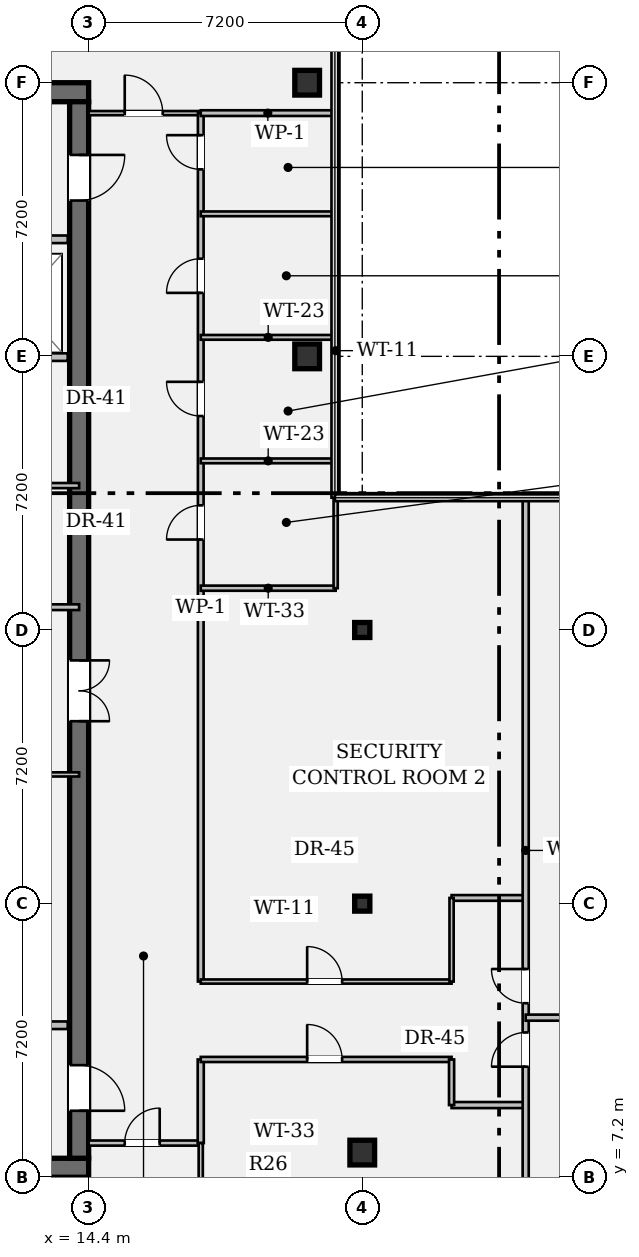
"""IFC4 building model, lengths in metres.
Left out: names, types, materials, properties, quantities, classifications, styles, units other than length and angle.
Written with IfcOpenShell. Run it as: python <this file> out.ifc"""

import sys

from ifc_helpers import new_model, si_unit, direction, frame, frame_2d, origin, origin_2d, place, context, subcontext, project, spatial, rectangle, hollow_rectangle, i_section, extrude, element, fill, save


model = new_model("IFC4")
c1 = context("Model", 3, precision=1e-05, world=origin(), true_north=direction((0.0, 1.0)))
c2 = subcontext(c1, "Body", "Model", "MODEL_VIEW")
j1 = project(units=[si_unit("LENGTHUNIT", "METRE"), si_unit("PLANEANGLEUNIT", "RADIAN")], contexts=[c1])
p1 = place(None, origin())
s1 = spatial("IfcSite", under=j1, at=p1, CompositionType="ELEMENT")
p2 = place(p1, origin())
s2 = spatial("IfcBuilding", under=s1, at=p2, CompositionType="ELEMENT")
p3 = place(p2, frame((0.0, 0.0, 244.65)))
s3 = spatial("IfcBuildingStorey", under=s2, at=p3, CompositionType="ELEMENT", Elevation=244.65)
for number, where, z_axis, x_axis in (
    (1, (0.5, 7.45, 0.0), (0.0, 0.0, 1.0), (1.0, 0.0, 0.0)),
    (2, (0.5, 35.75, 0.0), (0.0, 0.0, 1.0), (1.0, 0.0, 0.0)),
):
    element("IfcWall", number, at=place(p3, frame(where, z_axis=z_axis, x_axis=x_axis)), inside=s3, PredefinedType="SHEAR", context=c2, shape_type="SweptSolid", body=[
        extrude(rectangle(XDim=13.9, YDim=0.5, at=frame_2d((6.95, 0.0))), origin(), (0.0, 0.0, 1.0), 3.24),
    ])
p4 = place(p3, frame((14.15, 35.5, 0.0), z_axis=(0.0, 0.0, 1.0), x_axis=(0.0, -1.0, 0.0)))
e3 = element("IfcWall", 3, at=p4, inside=s3, PredefinedType="SHEAR", context=c2, shape_type="SweptSolid", body=[
    extrude(rectangle(XDim=27.8, YDim=0.5, at=frame_2d((13.9, 0.0))), origin(), (0.0, 0.0, 1.0), 3.24),
])
p5 = place(p4, frame((1.4, 0.0, 0.0)))
e4 = element("IfcOpeningElement", 4, at=p5, cuts=e3, PredefinedType="OPENING", context=c2, shape_type="SweptSolid", body=[
    extrude(rectangle(XDim=1.2, YDim=2.15, at=frame_2d((0.6, 1.075))), frame((0.0, 0.262, 0.0), z_axis=(0.0, -1.0, 0.0), x_axis=(1.0, 0.0, 0.0)), (0.0, 0.0, 1.0), 0.524),
])
p6 = place(p4, frame((25.35, 0.0, 0.0)))
e5 = element("IfcOpeningElement", 5, at=p6, cuts=e3, PredefinedType="OPENING", context=c2, shape_type="SweptSolid", body=[
    extrude(rectangle(XDim=1.2, YDim=2.15, at=frame_2d((0.6, 1.075))), frame((0.0, 0.262, 0.0), z_axis=(0.0, -1.0, 0.0), x_axis=(1.0, 0.0, 0.0)), (0.0, 0.0, 1.0), 0.524),
])
p7 = place(p4, frame((14.7, 0.0, 0.0)))
e6 = element("IfcOpeningElement", 6, at=p7, cuts=e3, PredefinedType="OPENING", context=c2, shape_type="SweptSolid", body=[
    extrude(rectangle(XDim=1.6, YDim=2.2, at=frame_2d((0.8, 1.1))), frame((0.0, 0.262, 0.0), z_axis=(0.0, -1.0, 0.0), x_axis=(1.0, 0.0, 0.0)), (0.0, 0.0, 1.0), 0.524),
])
for number, where, z_axis, x_axis in (
    (7, (20.15, 28.8, 0.0), (0.0, 0.0, 1.0), (1.0, 0.0, 0.0)),
    (8, (20.15, 36.0, 0.0), (0.0, 0.0, 1.0), (1.0, 0.0, 0.0)),
    (9, (21.6, 7.85, 0.0), (0.0, 0.0, 1.0), (1.0, 0.0, 0.0)),
):
    element("IfcColumn", number, at=place(p3, frame(where, z_axis=z_axis, x_axis=x_axis)), inside=s3, PredefinedType="COLUMN", context=c2, shape_type="SweptSolid", body=[
        extrude(hollow_rectangle(XDim=0.65, YDim=0.65, WallThickness=0.04, at=origin_2d()), origin(), (0.0, 0.0, 1.0), 3.24),
    ])
for number, where, z_axis, x_axis in (
    (10, (21.6, 14.4, 0.0), (0.0, 0.0, 1.0), (1.0, 0.0, 0.0)),
    (11, (21.6, 21.6, 0.0), (0.0, 0.0, 1.0), (1.0, 0.0, 0.0)),
):
    element("IfcColumn", number, at=place(p3, frame(where, z_axis=z_axis, x_axis=x_axis)), inside=s3, PredefinedType="COLUMN", context=c2, shape_type="SweptSolid", body=[
        extrude(i_section(OverallWidth=0.399, OverallDepth=0.394, WebThickness=0.023, FlangeThickness=0.037, FilletRadius=0.018, at=origin_2d()), origin(), (0.0, 0.0, 1.0), 3.24),
    ])
p8 = place(p3, frame((8.7, 31.88, 0.0), z_axis=(0.0, 0.0, 1.0), x_axis=(1.0, 0.0, 0.0)))
e12 = element("IfcWall", 12, at=p8, inside=s3, PredefinedType="PARTITIONING", context=c2, shape_type="SweptSolid", body=[
    extrude(rectangle(XDim=5.15, YDim=0.2, at=frame_2d((2.575, 0.0))), origin(), (0.0, 0.0, 1.0), 3.24),
])
p9 = place(p8, frame((0.75, 0.0, 0.0)))
e13 = element("IfcOpeningElement", 13, at=p9, cuts=e12, PredefinedType="OPENING", context=c2, shape_type="SweptSolid", body=[
    extrude(rectangle(XDim=1.2, YDim=2.2, at=frame_2d((0.6, 1.1))), frame((0.0, 0.112, 0.0), z_axis=(0.0, -1.0, 0.0), x_axis=(1.0, 0.0, 0.0)), (0.0, 0.0, 1.0), 0.224),
])
p10 = place(p8, frame((3.25, 0.0, 0.0)))
e14 = element("IfcOpeningElement", 14, at=p10, cuts=e12, PredefinedType="OPENING", context=c2, shape_type="SweptSolid", body=[
    extrude(rectangle(XDim=1.2, YDim=2.2, at=frame_2d((0.6, 1.1))), frame((0.0, 0.112, 0.0), z_axis=(0.0, -1.0, 0.0), x_axis=(1.0, 0.0, 0.0)), (0.0, 0.0, 1.0), 0.224),
])
for number, where, z_axis, x_axis in (
    (15, (8.7, 11.2, 0.0), (0.0, 0.0, 1.0), (1.0, 0.0, 0.0)),
    (16, (8.7, 28.78, 0.0), (0.0, 0.0, 1.0), (1.0, 0.0, 0.0)),
):
    element("IfcWall", number, at=place(p3, frame(where, z_axis=z_axis, x_axis=x_axis)), inside=s3, PredefinedType="PARTITIONING", context=c2, shape_type="SweptSolid", body=[
        extrude(rectangle(XDim=5.15, YDim=0.2, at=frame_2d((2.575, 0.0))), origin(), (0.0, 0.0, 1.0), 3.24),
    ])
p11 = place(p3, frame((7.1, 22.2, 0.0), z_axis=(0.0, 0.0, 1.0), x_axis=(1.0, 0.0, 0.0)))
e17 = element("IfcWall", 17, at=p11, inside=s3, PredefinedType="PARTITIONING", context=c2, shape_type="SweptSolid", body=[
    extrude(rectangle(XDim=7.05, YDim=0.15, at=frame_2d((3.525, 0.0))), origin(), (0.0, 0.0, 1.0), 3.24),
])
p12 = place(p3, frame((7.1, 25.4, 0.0), z_axis=(0.0, 0.0, 1.0), x_axis=(1.0, 0.0, 0.0)))
e18 = element("IfcWall", 18, at=p12, inside=s3, PredefinedType="PARTITIONING", context=c2, shape_type="SweptSolid", body=[
    extrude(rectangle(XDim=7.05, YDim=0.135, at=frame_2d((3.525, 0.0))), origin(), (0.0, 0.0, 1.0), 3.24),
])
p13 = place(p3, frame((5.15, 17.8, 0.0), z_axis=(0.0, 0.0, 1.0), x_axis=(1.0, 0.0, 0.0)))
e19 = element("IfcWall", 19, at=p13, inside=s3, PredefinedType="PARTITIONING", context=c2, shape_type="SweptSolid", body=[
    extrude(rectangle(XDim=9.0, YDim=0.11, at=frame_2d((4.5, 0.0))), origin(), (0.0, 0.0, 1.0), 3.24),
])
p14 = place(p13, frame((4.35, 0.0, 0.0)))
e20 = element("IfcOpeningElement", 20, at=p14, cuts=e19, PredefinedType="OPENING", context=c2, shape_type="SweptSolid", body=[
    extrude(rectangle(XDim=1.0, YDim=2.15, at=frame_2d((0.5, 1.075))), frame((0.0, 0.067, 0.0), z_axis=(0.0, -1.0, 0.0), x_axis=(1.0, 0.0, 0.0)), (0.0, 0.0, 1.0), 0.134),
])
p15 = place(p3, frame((14.4, 8.1, 0.0), z_axis=(0.0, 0.0, 1.0), x_axis=(1.0, 0.0, 0.0)))
e21 = element("IfcWall", 21, at=p15, inside=s3, PredefinedType="PARTITIONING", context=c2, shape_type="SweptSolid", body=[
    extrude(rectangle(XDim=2.95, YDim=0.135, at=frame_2d((1.475, 0.0))), origin(), (0.0, 0.0, 1.0), 3.24),
])
p16 = place(p15, frame((0.95, 0.0, 0.0)))
e22 = element("IfcOpeningElement", 22, at=p16, cuts=e21, PredefinedType="OPENING", context=c2, shape_type="SweptSolid", body=[
    extrude(rectangle(XDim=0.92, YDim=2.15, at=frame_2d((0.46, 1.075))), frame((0.0, 0.08, 0.0), z_axis=(0.0, -1.0, 0.0), x_axis=(1.0, 0.0, 0.0)), (0.0, 0.0, 1.0), 0.159),
])
p17 = place(p3, frame((14.4, 35.2, 0.0), z_axis=(0.0, 0.0, 1.0), x_axis=(1.0, 0.0, 0.0)))
e23 = element("IfcWall", 23, at=p17, inside=s3, PredefinedType="PARTITIONING", context=c2, shape_type="SweptSolid", body=[
    extrude(rectangle(XDim=2.95, YDim=0.11, at=frame_2d((1.475, 0.0))), origin(), (0.0, 0.0, 1.0), 2.808),
])
p18 = place(p17, frame((0.95, 0.0, 0.0)))
e24 = element("IfcOpeningElement", 24, at=p18, cuts=e23, PredefinedType="OPENING", context=c2, shape_type="SweptSolid", body=[
    extrude(rectangle(XDim=1.0, YDim=2.15, at=frame_2d((0.5, 1.075))), frame((0.0, 0.067, 0.0), z_axis=(0.0, -1.0, 0.0), x_axis=(1.0, 0.0, 0.0)), (0.0, 0.0, 1.0), 0.134),
])
p19 = place(p3, frame((17.35, 8.1, 0.0), z_axis=(0.0, 0.0, 1.0), x_axis=(0.0, 1.0, 0.0)))
e25 = element("IfcWall", 25, at=p19, inside=s3, PredefinedType="PARTITIONING", context=c2, shape_type="SweptSolid", body=[
    extrude(rectangle(XDim=2.2, YDim=0.16, at=frame_2d((1.1, 0.0))), origin(), (0.0, 0.0, 1.0), 3.24),
])
p20 = place(p3, frame((17.35, 12.35, 0.0), z_axis=(0.0, 0.0, 1.0), x_axis=(0.0, 1.0, 0.0)))
e26 = element("IfcWall", 26, at=p20, inside=s3, PredefinedType="PARTITIONING", context=c2, shape_type="SweptSolid", body=[
    extrude(rectangle(XDim=22.85, YDim=0.15, at=frame_2d((11.425, 0.0))), origin(), (0.0, 0.0, 1.0), 2.676),
])
p21 = place(p20, frame((11.63, 0.0, 0.0)))
e27 = element("IfcOpeningElement", 27, at=p21, cuts=e26, PredefinedType="OPENING", context=c2, shape_type="SweptSolid", body=[
    extrude(rectangle(XDim=0.9, YDim=2.15, at=frame_2d((0.45, 1.075))), frame((0.0, 0.087, 0.0), z_axis=(0.0, -1.0, 0.0), x_axis=(1.0, 0.0, 0.0)), (0.0, 0.0, 1.0), 0.174),
])
p22 = place(p20, frame((14.88, 0.0, 0.0)))
e28 = element("IfcOpeningElement", 28, at=p22, cuts=e26, PredefinedType="OPENING", context=c2, shape_type="SweptSolid", body=[
    extrude(rectangle(XDim=0.9, YDim=2.15, at=frame_2d((0.45, 1.075))), frame((0.0, 0.087, 0.0), z_axis=(0.0, -1.0, 0.0), x_axis=(1.0, 0.0, 0.0)), (0.0, 0.0, 1.0), 0.174),
])
p23 = place(p20, frame((18.12, 0.0, 0.0)))
e29 = element("IfcOpeningElement", 29, at=p23, cuts=e26, PredefinedType="OPENING", context=c2, shape_type="SweptSolid", body=[
    extrude(rectangle(XDim=0.9, YDim=2.15, at=frame_2d((0.45, 1.075))), frame((0.0, 0.087, 0.0), z_axis=(0.0, -1.0, 0.0), x_axis=(1.0, 0.0, 0.0)), (0.0, 0.0, 1.0), 0.174),
])
p24 = place(p20, frame((21.37, 0.0, 0.0)))
e30 = element("IfcOpeningElement", 30, at=p24, cuts=e26, PredefinedType="OPENING", context=c2, shape_type="SweptSolid", body=[
    extrude(rectangle(XDim=0.9, YDim=2.15, at=frame_2d((0.45, 1.075))), frame((0.0, 0.087, 0.0), z_axis=(0.0, -1.0, 0.0), x_axis=(1.0, 0.0, 0.0)), (0.0, 0.0, 1.0), 0.174),
])
p25 = place(p3, frame((17.35, 10.3, 0.0), z_axis=(0.0, 0.0, 1.0), x_axis=(1.0, 0.0, 0.0)))
e31 = element("IfcWall", 31, at=p25, inside=s3, PredefinedType="PARTITIONING", context=c2, shape_type="SweptSolid", body=[
    extrude(rectangle(XDim=6.6, YDim=0.135, at=frame_2d((3.3, 0.0))), origin(), (0.0, 0.0, 1.0), 2.676),
])
p26 = place(p25, frame((2.8, 0.0, 0.0)))
e32 = element("IfcOpeningElement", 32, at=p26, cuts=e31, PredefinedType="OPENING", context=c2, shape_type="SweptSolid", body=[
    extrude(rectangle(XDim=0.92, YDim=2.15, at=frame_2d((0.46, 1.075))), frame((0.0, 0.08, 0.0), z_axis=(0.0, -1.0, 0.0), x_axis=(1.0, 0.0, 0.0)), (0.0, 0.0, 1.0), 0.159),
])
p27 = place(p3, frame((17.35, 12.35, 0.0), z_axis=(0.0, 0.0, 1.0), x_axis=(1.0, 0.0, 0.0)))
e33 = element("IfcWall", 33, at=p27, inside=s3, PredefinedType="PARTITIONING", context=c2, shape_type="SweptSolid", body=[
    extrude(rectangle(XDim=6.6, YDim=0.11, at=frame_2d((3.3, 0.0))), origin(), (0.0, 0.0, 1.0), 2.676),
])
p28 = place(p27, frame((2.8, 0.0, 0.0)))
e34 = element("IfcOpeningElement", 34, at=p28, cuts=e33, PredefinedType="OPENING", context=c2, shape_type="SweptSolid", body=[
    extrude(rectangle(XDim=0.92, YDim=2.15, at=frame_2d((0.46, 1.075))), frame((0.0, 0.067, 0.0), z_axis=(0.0, -1.0, 0.0), x_axis=(1.0, 0.0, 0.0)), (0.0, 0.0, 1.0), 0.134),
])
p29 = place(p3, frame((23.95, 9.1, 0.0), z_axis=(0.0, 0.0, 1.0), x_axis=(1.0, 0.0, 0.0)))
e35 = element("IfcWall", 35, at=p29, inside=s3, PredefinedType="PARTITIONING", context=c2, shape_type="SweptSolid", body=[
    extrude(rectangle(XDim=1.95, YDim=0.16, at=frame_2d((0.975, 0.0))), origin(), (0.0, 0.0, 1.0), 2.808),
])
p30 = place(p3, frame((23.95, 14.55, 0.0), z_axis=(0.0, 0.0, 1.0), x_axis=(1.0, 0.0, 0.0)))
e36 = element("IfcWall", 36, at=p30, inside=s3, PredefinedType="PARTITIONING", context=c2, shape_type="SweptSolid", body=[
    extrude(rectangle(XDim=1.95, YDim=0.15, at=frame_2d((0.975, 0.0))), origin(), (0.0, 0.0, 1.0), 2.676),
])
p31 = place(p3, frame((23.95, 9.1, 0.0), z_axis=(0.0, 0.0, 1.0), x_axis=(0.0, 1.0, 0.0)))
e37 = element("IfcWall", 37, at=p31, inside=s3, PredefinedType="PARTITIONING", context=c2, shape_type="SweptSolid", body=[
    extrude(rectangle(XDim=1.2, YDim=0.135, at=frame_2d((0.6, 0.0))), origin(), (0.0, 0.0, 1.0), 2.808),
])
p32 = place(p3, frame((23.95, 12.35, 0.0), z_axis=(0.0, 0.0, 1.0), x_axis=(0.0, 1.0, 0.0)))
e38 = element("IfcWall", 38, at=p32, inside=s3, PredefinedType="PARTITIONING", context=c2, shape_type="SweptSolid", body=[
    extrude(rectangle(XDim=2.2, YDim=0.11, at=frame_2d((1.1, 0.0))), origin(), (0.0, 0.0, 1.0), 2.676),
])
p33 = place(p3, frame((25.9, 6.52, 0.0), z_axis=(0.0, 0.0, 1.0), x_axis=(0.0, 1.0, 0.0)))
e39 = element("IfcWall", 39, at=p33, inside=s3, PredefinedType="PARTITIONING", context=c2, shape_type="SweptSolid", body=[
    extrude(rectangle(XDim=18.56, YDim=0.16, at=frame_2d((9.28, 0.0))), origin(), (0.0, 0.0, 1.0), 2.676),
])
p34 = place(p33, frame((3.59, 0.0, 0.0)))
e40 = element("IfcOpeningElement", 40, at=p34, cuts=e39, PredefinedType="OPENING", context=c2, shape_type="SweptSolid", body=[
    extrude(rectangle(XDim=0.9, YDim=2.15, at=frame_2d((0.45, 1.075))), frame((0.0, 0.092, 0.0), z_axis=(0.0, -1.0, 0.0), x_axis=(1.0, 0.0, 0.0)), (0.0, 0.0, 1.0), 0.184),
])
p35 = place(p33, frame((5.26, 0.0, 0.0)))
e41 = element("IfcOpeningElement", 41, at=p35, cuts=e39, PredefinedType="OPENING", context=c2, shape_type="SweptSolid", body=[
    extrude(rectangle(XDim=0.9, YDim=2.15, at=frame_2d((0.45, 1.075))), frame((0.0, 0.092, 0.0), z_axis=(0.0, -1.0, 0.0), x_axis=(1.0, 0.0, 0.0)), (0.0, 0.0, 1.0), 0.184),
])
p36 = place(p3, frame((17.35, 35.2, 0.0), z_axis=(0.0, 0.0, 1.0), x_axis=(1.0, 0.0, 0.0)))
e42 = element("IfcWall", 42, at=p36, inside=s3, PredefinedType="PARTITIONING", context=c2, shape_type="SweptSolid", body=[
    extrude(rectangle(XDim=3.53, YDim=0.15, at=frame_2d((1.765, 0.0))), origin(), (0.0, 0.0, 1.0), 2.808),
])
p37 = place(p3, frame((17.35, 22.7, 0.0), z_axis=(0.0, 0.0, 1.0), x_axis=(1.0, 0.0, 0.0)))
e43 = element("IfcWall", 43, at=p37, inside=s3, PredefinedType="PARTITIONING", context=c2, shape_type="SweptSolid", body=[
    extrude(rectangle(XDim=3.55, YDim=0.135, at=frame_2d((1.775, 0.0))), origin(), (0.0, 0.0, 1.0), 2.808),
])
p38 = place(p3, frame((20.9, 22.7, 0.0), z_axis=(0.0, 0.0, 1.0), x_axis=(0.0, 1.0, 0.0)))
e44 = element("IfcWall", 44, at=p38, inside=s3, PredefinedType="PARTITIONING", context=c2, shape_type="SweptSolid", body=[
    extrude(rectangle(XDim=12.5, YDim=0.11, at=frame_2d((6.25, 0.0))), origin(), (0.0, 0.0, 1.0), 3.24),
])
for number, where, z_axis, x_axis in (
    (45, (17.35, 26.05, 0.0), (0.0, 0.0, 1.0), (1.0, 0.0, 0.0)),
    (46, (17.35, 29.3, 0.0), (0.0, 0.0, 1.0), (1.0, 0.0, 0.0)),
    (47, (17.35, 32.55, 0.0), (0.0, 0.0, 1.0), (1.0, 0.0, 0.0)),
):
    element("IfcWall", number, at=place(p3, frame(where, z_axis=z_axis, x_axis=x_axis)), inside=s3, PredefinedType="PARTITIONING", context=c2, shape_type="SweptSolid", body=[
        extrude(rectangle(XDim=3.55, YDim=0.125, at=frame_2d((1.775, 0.0))), origin(), (0.0, 0.0, 1.0), 2.808),
    ])
p39 = place(p3, frame((17.35, 6.52, 0.0), z_axis=(0.0, 0.0, 1.0), x_axis=(0.0, 1.0, 0.0)))
e48 = element("IfcWall", 48, at=p39, inside=s3, PredefinedType="PARTITIONING", context=c2, shape_type="SweptSolid", body=[
    extrude(rectangle(XDim=1.58, YDim=0.11, at=frame_2d((0.79, 0.0))), origin(), (0.0, 0.0, 1.0), 3.24),
])
p40 = place(p3, frame((25.9, 11.4, 0.0), z_axis=(0.0, 0.0, 1.0), x_axis=(1.0, 0.0, 0.0)))
e49 = element("IfcWall", 49, at=p40, inside=s3, PredefinedType="PARTITIONING", context=c2, shape_type="SweptSolid", body=[
    extrude(rectangle(XDim=19.58, YDim=0.16, at=frame_2d((9.79, 0.0))), origin(), (0.0, 0.0, 1.0), 2.676),
])
p41 = place(p5, origin())
e50 = element("IfcDoor", 50, at=p41, inside=s3, OperationType="SINGLE_SWING_LEFT", PredefinedType="DOOR", context=c2, shape_type="SweptSolid", body=[
    extrude(rectangle(XDim=1.2, YDim=2.15, at=frame_2d((0.6, 1.075))), frame((0.0, 0.025, 0.0), z_axis=(0.0, -1.0, 0.0), x_axis=(1.0, 0.0, 0.0)), (0.0, 0.0, 1.0), 0.05),
])
fill(e4, e50)
p42 = place(p6, origin())
e51 = element("IfcDoor", 51, at=p42, inside=s3, OperationType="SINGLE_SWING_RIGHT", PredefinedType="DOOR", context=c2, shape_type="SweptSolid", body=[
    extrude(rectangle(XDim=1.2, YDim=2.15, at=frame_2d((0.6, 1.075))), frame((0.0, 0.025, 0.0), z_axis=(0.0, -1.0, 0.0), x_axis=(1.0, 0.0, 0.0)), (0.0, 0.0, 1.0), 0.05),
])
fill(e5, e51)
p43 = place(p7, origin())
e52 = element("IfcDoor", 52, at=p43, inside=s3, OperationType="DOUBLE_DOOR_SINGLE_SWING", PredefinedType="DOOR", context=c2, shape_type="SweptSolid", body=[
    extrude(rectangle(XDim=1.6, YDim=2.2, at=frame_2d((0.8, 1.1))), frame((0.0, 0.025, 0.0), z_axis=(0.0, -1.0, 0.0), x_axis=(1.0, 0.0, 0.0)), (0.0, 0.0, 1.0), 0.05),
])
fill(e6, e52)
p44 = place(p18, origin())
e53 = element("IfcDoor", 53, at=p44, inside=s3, OperationType="SINGLE_SWING_LEFT", PredefinedType="DOOR", context=c2, shape_type="SweptSolid", body=[
    extrude(rectangle(XDim=1.0, YDim=2.15, at=frame_2d((0.5, 1.075))), frame((0.0, 0.025, 0.0), z_axis=(0.0, -1.0, 0.0), x_axis=(1.0, 0.0, 0.0)), (0.0, 0.0, 1.0), 0.05),
])
fill(e24, e53)
p45 = place(p21, origin())
e54 = element("IfcDoor", 54, at=p45, inside=s3, OperationType="SINGLE_SWING_LEFT", PredefinedType="DOOR", context=c2, shape_type="SweptSolid", body=[
    extrude(rectangle(XDim=0.9, YDim=2.15, at=frame_2d((0.45, 1.075))), frame((0.0, 0.025, 0.0), z_axis=(0.0, -1.0, 0.0), x_axis=(1.0, 0.0, 0.0)), (0.0, 0.0, 1.0), 0.05),
])
fill(e27, e54)
p46 = place(p22, origin())
e55 = element("IfcDoor", 55, at=p46, inside=s3, OperationType="SINGLE_SWING_RIGHT", PredefinedType="DOOR", context=c2, shape_type="SweptSolid", body=[
    extrude(rectangle(XDim=0.9, YDim=2.15, at=frame_2d((0.45, 1.075))), frame((0.0, 0.025, 0.0), z_axis=(0.0, -1.0, 0.0), x_axis=(1.0, 0.0, 0.0)), (0.0, 0.0, 1.0), 0.05),
])
fill(e28, e55)
p47 = place(p23, origin())
e56 = element("IfcDoor", 56, at=p47, inside=s3, OperationType="SINGLE_SWING_LEFT", PredefinedType="DOOR", context=c2, shape_type="SweptSolid", body=[
    extrude(rectangle(XDim=0.9, YDim=2.15, at=frame_2d((0.45, 1.075))), frame((0.0, 0.025, 0.0), z_axis=(0.0, -1.0, 0.0), x_axis=(1.0, 0.0, 0.0)), (0.0, 0.0, 1.0), 0.05),
])
fill(e29, e56)
p48 = place(p24, origin())
e57 = element("IfcDoor", 57, at=p48, inside=s3, OperationType="SINGLE_SWING_RIGHT", PredefinedType="DOOR", context=c2, shape_type="SweptSolid", body=[
    extrude(rectangle(XDim=0.9, YDim=2.15, at=frame_2d((0.45, 1.075))), frame((0.0, 0.025, 0.0), z_axis=(0.0, -1.0, 0.0), x_axis=(1.0, 0.0, 0.0)), (0.0, 0.0, 1.0), 0.05),
])
fill(e30, e57)
p49 = place(p28, origin())
e58 = element("IfcDoor", 58, at=p49, inside=s3, OperationType="SINGLE_SWING_LEFT", PredefinedType="DOOR", context=c2, shape_type="SweptSolid", body=[
    extrude(rectangle(XDim=0.92, YDim=2.15, at=frame_2d((0.46, 1.075))), frame((0.0, 0.025, 0.0), z_axis=(0.0, -1.0, 0.0), x_axis=(1.0, 0.0, 0.0)), (0.0, 0.0, 1.0), 0.05),
])
fill(e34, e58)
p50 = place(p16, origin())
e59 = element("IfcDoor", 59, at=p50, inside=s3, OperationType="SINGLE_SWING_RIGHT", PredefinedType="DOOR", context=c2, shape_type="SweptSolid", body=[
    extrude(rectangle(XDim=0.92, YDim=2.15, at=frame_2d((0.46, 1.075))), frame((0.0, 0.025, 0.0), z_axis=(0.0, -1.0, 0.0), x_axis=(1.0, 0.0, 0.0)), (0.0, 0.0, 1.0), 0.05),
])
fill(e22, e59)
p51 = place(p26, origin())
e60 = element("IfcDoor", 60, at=p51, inside=s3, OperationType="SINGLE_SWING_LEFT", PredefinedType="DOOR", context=c2, shape_type="SweptSolid", body=[
    extrude(rectangle(XDim=0.92, YDim=2.15, at=frame_2d((0.46, 1.075))), frame((0.0, 0.025, 0.0), z_axis=(0.0, -1.0, 0.0), x_axis=(1.0, 0.0, 0.0)), (0.0, 0.0, 1.0), 0.05),
])
fill(e32, e60)
p52 = place(p34, origin())
e61 = element("IfcDoor", 61, at=p52, inside=s3, OperationType="SINGLE_SWING_LEFT", PredefinedType="DOOR", context=c2, shape_type="SweptSolid", body=[
    extrude(rectangle(XDim=0.9, YDim=2.15, at=frame_2d((0.45, 1.075))), frame((0.0, 0.025, 0.0), z_axis=(0.0, -1.0, 0.0), x_axis=(1.0, 0.0, 0.0)), (0.0, 0.0, 1.0), 0.05),
])
fill(e40, e61)
p53 = place(p35, origin())
e62 = element("IfcDoor", 62, at=p53, inside=s3, OperationType="SINGLE_SWING_RIGHT", PredefinedType="DOOR", context=c2, shape_type="SweptSolid", body=[
    extrude(rectangle(XDim=0.9, YDim=2.15, at=frame_2d((0.45, 1.075))), frame((0.0, 0.025, 0.0), z_axis=(0.0, -1.0, 0.0), x_axis=(1.0, 0.0, 0.0)), (0.0, 0.0, 1.0), 0.05),
])
fill(e41, e62)
save(model, sys.argv[1])
